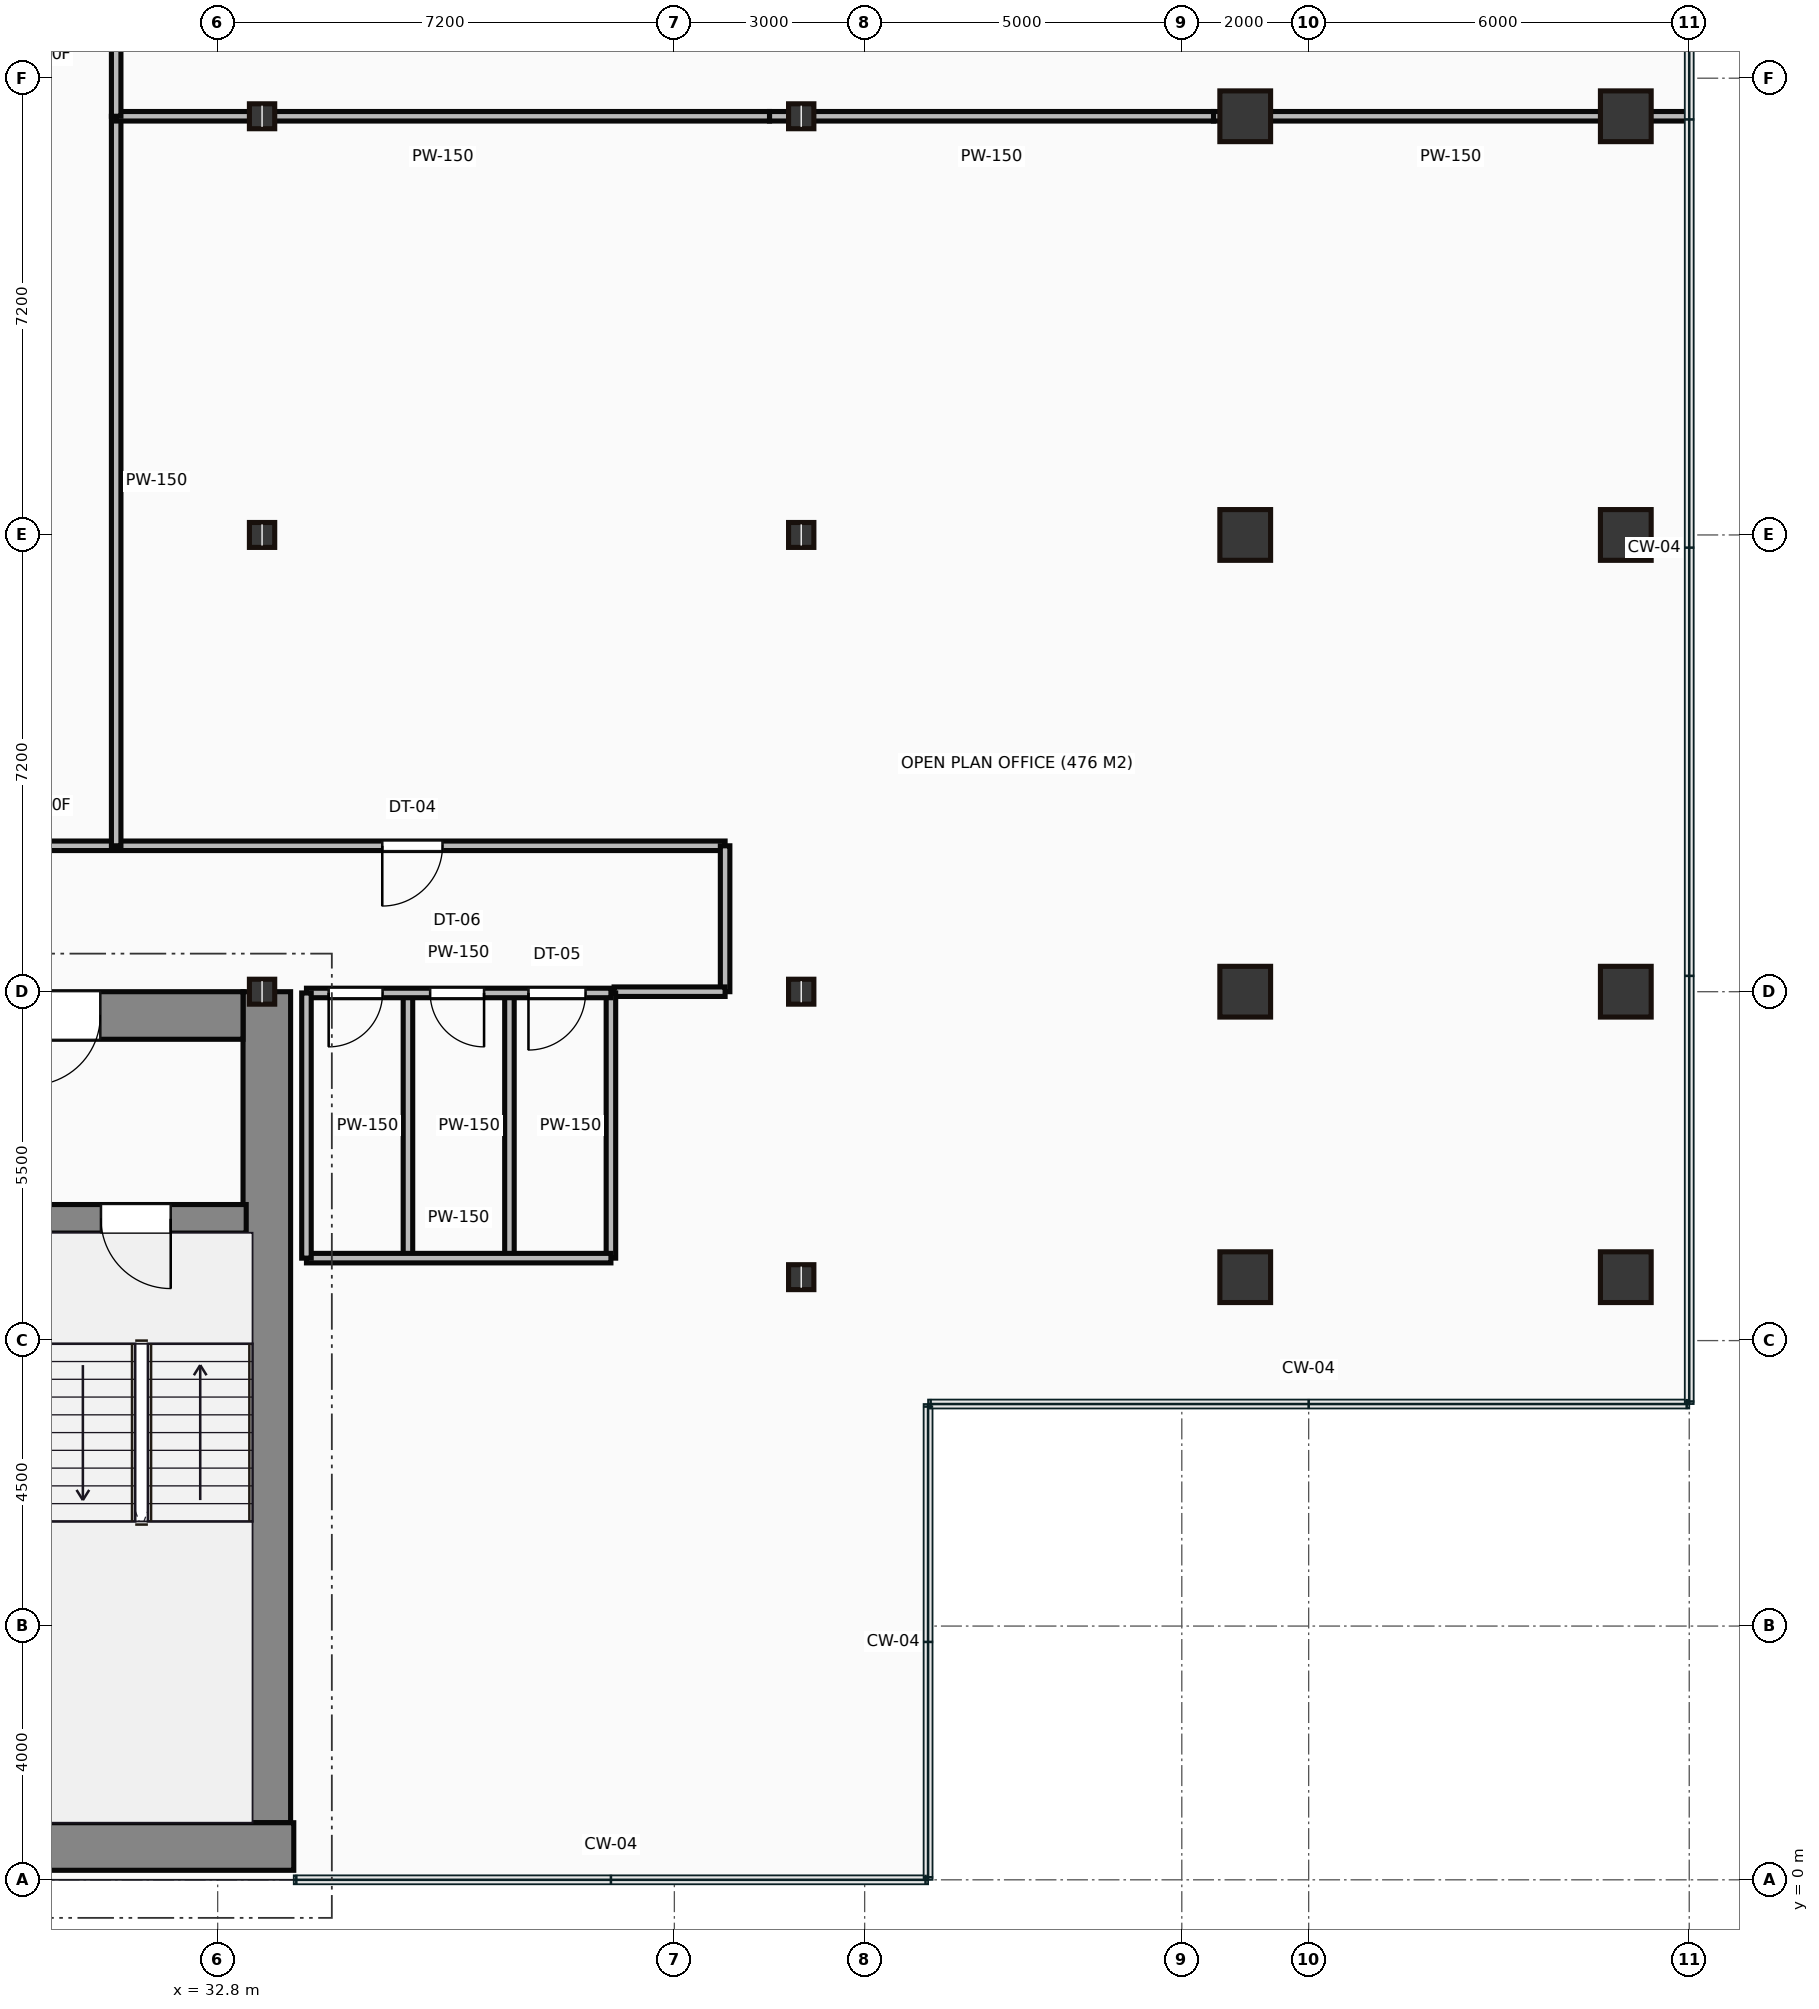
"""IFC4 building model, lengths in metres.
Left out: names, types, materials, properties, quantities, classifications, styles, units other than length and angle.
Written with IfcOpenShell. Run it as: python <this file> out.ifc"""

import sys

from ifc_helpers import new_model, si_unit, direction, frame, frame_2d, origin, origin_2d, place, context, subcontext, project, spatial, rectangle, hollow_rectangle, i_section, extrude, source, transform, mapped, element, fill, save


model = new_model("IFC4")
c1 = context("Model", 3, precision=1e-05, world=origin(), true_north=direction((0.0, 1.0)))
c2 = subcontext(c1, "Body", "Model", "MODEL_VIEW")
j1 = project(units=[si_unit("LENGTHUNIT", "METRE"), si_unit("PLANEANGLEUNIT", "RADIAN")], contexts=[c1])
p1 = place(None, origin())
s1 = spatial("IfcSite", under=j1, at=p1, CompositionType="ELEMENT")
p2 = place(p1, origin())
s2 = spatial("IfcBuilding", under=s1, at=p2, CompositionType="ELEMENT")
p3 = place(p2, frame((0.0, 0.0, 110.55)))
s3 = spatial("IfcBuildingStorey", under=s2, at=p3, CompositionType="ELEMENT", Elevation=110.55)
m1 = source(origin(), c2, "Body", "SweptSolid", [
    extrude(rectangle(XDim=29.5, YDim=0.75, at=frame_2d((14.75, 0.0))), origin(), (0.0, 0.0, 1.0), 3.65),
])
p4 = place(p3, frame((4.5, 0.525, 0.0), z_axis=(0.0, 0.0, 1.0), x_axis=(1.0, 0.0, 0.0)))
e1 = element("IfcWall", 1, at=p4, inside=s3, PredefinedType="SHEAR", context=c2, shape_type="MappedRepresentation", body=[
    mapped(m1, transform((0.0, 0.0, 0.0))),
])
m2 = source(origin(), c2, "Body", "SweptSolid", [
    extrude(rectangle(XDim=13.1, YDim=0.75, at=frame_2d((6.55, 0.0))), origin(), (0.0, 0.0, 1.0), 3.65),
])
p5 = place(p3, frame((33.575, 0.9, 0.0), z_axis=(0.0, 0.0, 1.0), x_axis=(0.0, 1.0, 0.0)))
e2 = element("IfcWall", 2, at=p5, inside=s3, PredefinedType="SHEAR", context=c2, shape_type="MappedRepresentation", body=[
    mapped(m2, transform((0.0, 0.0, 0.0))),
])
m3 = source(origin(), c2, "Body", "SweptSolid", [
    extrude(rectangle(XDim=12.6, YDim=0.75, at=frame_2d((6.3, 0.0))), origin(), (0.0, 0.0, 1.0), 3.65),
])
p6 = place(p3, frame((20.6, 13.625, 0.0), z_axis=(0.0, 0.0, 1.0), x_axis=(1.0, 0.0, 0.0)))
e3 = element("IfcWall", 3, at=p6, inside=s3, PredefinedType="SHEAR", context=c2, shape_type="MappedRepresentation", body=[
    mapped(m3, transform((0.0, 0.0, 0.0))),
])
p7 = place(p6, frame((9.25, 0.0, 0.0)))
e4 = element("IfcOpeningElement", 4, at=p7, cuts=e3, PredefinedType="OPENING", context=c2, shape_type="SweptSolid", body=[
    extrude(rectangle(XDim=1.1, YDim=2.15, at=frame_2d((0.55, 1.075))), frame((0.0, 0.385, 0.0), z_axis=(0.0, -1.0, 0.0), x_axis=(1.0, 0.0, 0.0)), (0.0, 0.0, 1.0), 0.77),
])
m4 = source(origin(), c2, "Body", "SweptSolid", [
    extrude(rectangle(XDim=3.39, YDim=0.45, at=frame_2d((1.695, 0.0))), origin(), (0.0, 0.0, 1.0), 3.65),
])
p8 = place(p3, frame((29.86, 10.42, 0.0), z_axis=(0.0, 0.0, 1.0), x_axis=(1.0, 0.0, 0.0)))
e5 = element("IfcWall", 5, at=p8, inside=s3, PredefinedType="SHEAR", context=c2, shape_type="MappedRepresentation", body=[
    mapped(m4, transform((0.0, 0.0, 0.0))),
])
p9 = place(p8, frame((1.1, 0.0, 0.0)))
e6 = element("IfcOpeningElement", 6, at=p9, cuts=e5, PredefinedType="OPENING", context=c2, shape_type="SweptSolid", body=[
    extrude(rectangle(XDim=1.1, YDim=2.15, at=frame_2d((0.55, 1.075))), frame((0.0, 0.235, 0.0), z_axis=(0.0, -1.0, 0.0), x_axis=(1.0, 0.0, 0.0)), (0.0, 0.0, 1.0), 0.47),
])
m5 = source(origin(), c2, "Body", "SweptSolid", [
    extrude(i_section(OverallWidth=0.399, OverallDepth=0.393, WebThickness=0.023, FlangeThickness=0.037, at=origin_2d()), origin(), (0.0, 0.0, 1.0), 3.65),
])
for number, where, z_axis, x_axis in (
    (7, (33.5, 14.0, 0.0), (0.0, 0.0, 1.0), (1.0, 0.0, 0.0)),
    (8, (33.5, 21.2, 0.0), (0.0, 0.0, 1.0), (1.0, 0.0, 0.0)),
    (9, (33.5, 27.8, 0.0), (0.0, 0.0, 1.0), (1.0, 0.0, 0.0)),
    (10, (42.0, 9.5, 0.0), (0.0, 0.0, 1.0), (1.0, 0.0, 0.0)),
    (11, (42.0, 14.0, 0.0), (0.0, 0.0, 1.0), (1.0, 0.0, 0.0)),
    (12, (42.0, 21.2, 0.0), (0.0, 0.0, 1.0), (1.0, 0.0, 0.0)),
    (13, (42.0, 27.8, 0.0), (0.0, 0.0, 1.0), (1.0, 0.0, 0.0)),
):
    element("IfcColumn", number, at=place(p3, frame(where, z_axis=z_axis, x_axis=x_axis)), inside=s3, PredefinedType="COLUMN", context=c2, shape_type="MappedRepresentation", body=[
        mapped(m5, transform((0.0, 0.0, 0.0))),
    ])
m6 = source(origin(), c2, "Body", "SweptSolid", [
    extrude(hollow_rectangle(XDim=0.8, YDim=0.8, WallThickness=0.04, at=origin_2d()), origin(), (0.0, 0.0, 1.0), 3.65),
])
for number, where, z_axis, x_axis in (
    (14, (49.0, 9.5, 0.0), (0.0, 0.0, 1.0), (1.0, 0.0, 0.0)),
    (15, (49.0, 14.0, 0.0), (0.0, 0.0, 1.0), (1.0, 0.0, 0.0)),
    (16, (49.0, 21.2, 0.0), (0.0, 0.0, 1.0), (1.0, 0.0, 0.0)),
    (17, (49.0, 27.8, 0.0), (0.0, 0.0, 1.0), (1.0, 0.0, 0.0)),
    (18, (55.0, 9.5, 0.0), (0.0, 0.0, 1.0), (1.0, 0.0, 0.0)),
    (19, (55.0, 14.0, 0.0), (0.0, 0.0, 1.0), (1.0, 0.0, 0.0)),
    (20, (55.0, 21.2, 0.0), (0.0, 0.0, 1.0), (1.0, 0.0, 0.0)),
    (21, (55.0, 27.8, 0.0), (0.0, 0.0, 1.0), (1.0, 0.0, 0.0)),
):
    element("IfcColumn", number, at=place(p3, frame(where, z_axis=z_axis, x_axis=x_axis)), inside=s3, PredefinedType="COLUMN", context=c2, shape_type="MappedRepresentation", body=[
        mapped(m6, transform((0.0, 0.0, 0.0))),
    ])
m7 = source(origin(), c2, "Body", "SweptSolid", [
    extrude(rectangle(XDim=4.8, YDim=0.15, at=frame_2d((2.4, 0.0))), origin(), (0.0, 0.0, 1.0), 2.702),
])
p10 = place(p3, frame((34.2, 13.98, 0.0), z_axis=(0.0, 0.0, 1.0), x_axis=(1.0, 0.0, 0.0)))
e22 = element("IfcWall", 22, at=p10, inside=s3, PredefinedType="PARTITIONING", context=c2, shape_type="MappedRepresentation", body=[
    mapped(m7, transform((0.0, 0.0, 0.0))),
])
p11 = place(p10, frame((0.35, 0.0, 0.0)))
e23 = element("IfcOpeningElement", 23, at=p11, cuts=e22, PredefinedType="OPENING", context=c2, shape_type="SweptSolid", body=[
    extrude(rectangle(XDim=0.85, YDim=2.1, at=frame_2d((0.425, 1.05))), frame((0.0, 0.085, 0.0), z_axis=(0.0, -1.0, 0.0), x_axis=(1.0, 0.0, 0.0)), (0.0, 0.0, 1.0), 0.17),
])
p12 = place(p10, frame((1.95, 0.0, 0.0)))
e24 = element("IfcOpeningElement", 24, at=p12, cuts=e22, PredefinedType="OPENING", context=c2, shape_type="SweptSolid", body=[
    extrude(rectangle(XDim=0.85, YDim=2.1, at=frame_2d((0.425, 1.05))), frame((0.0, 0.085, 0.0), z_axis=(0.0, -1.0, 0.0), x_axis=(1.0, 0.0, 0.0)), (0.0, 0.0, 1.0), 0.17),
])
p13 = place(p10, frame((3.5, 0.0, 0.0)))
e25 = element("IfcOpeningElement", 25, at=p13, cuts=e22, PredefinedType="OPENING", context=c2, shape_type="SweptSolid", body=[
    extrude(rectangle(XDim=0.9, YDim=2.1, at=frame_2d((0.45, 1.05))), frame((0.0, 0.085, 0.0), z_axis=(0.0, -1.0, 0.0), x_axis=(1.0, 0.0, 0.0)), (0.0, 0.0, 1.0), 0.17),
])
m8 = source(origin(), c2, "Body", "SweptSolid", [
    extrude(rectangle(XDim=4.8, YDim=0.15, at=frame_2d((2.4, 0.0))), origin(), (0.0, 0.0, 1.0), 3.4),
])
p14 = place(p3, frame((34.2, 9.8, 0.0), z_axis=(0.0, 0.0, 1.0), x_axis=(1.0, 0.0, 0.0)))
e26 = element("IfcWall", 26, at=p14, inside=s3, PredefinedType="PARTITIONING", context=c2, shape_type="MappedRepresentation", body=[
    mapped(m8, transform((0.0, 0.0, 0.0))),
])
m9 = source(origin(), c2, "Body", "SweptSolid", [
    extrude(rectangle(XDim=4.18, YDim=0.15, at=frame_2d((2.09, 0.0))), origin(), (0.0, 0.0, 1.0), 3.4),
])
for number, where, z_axis, x_axis in (
    (27, (39.0, 9.8, 0.0), (0.0, 0.0, 1.0), (0.0, 1.0, 0.0)),
    (28, (34.2, 9.8, 0.0), (0.0, 0.0, 1.0), (0.0, 1.0, 0.0)),
    (29, (35.8, 9.8, 0.0), (0.0, 0.0, 1.0), (0.0, 1.0, 0.0)),
    (30, (37.4, 9.8, 0.0), (0.0, 0.0, 1.0), (0.0, 1.0, 0.0)),
):
    element("IfcWall", number, at=place(p3, frame(where, z_axis=z_axis, x_axis=x_axis)), inside=s3, PredefinedType="PARTITIONING", context=c2, shape_type="MappedRepresentation", body=[
        mapped(m9, transform((0.0, 0.0, 0.0))),
    ])
m10 = source(origin(), c2, "Body", "SweptSolid", [
    extrude(rectangle(XDim=21.75, YDim=0.15, at=frame_2d((10.875, 0.0))), origin(), (0.0, 0.0, 1.0), 3.4),
])
p15 = place(p3, frame((19.05, 16.3, 0.0), z_axis=(0.0, 0.0, 1.0), x_axis=(1.0, 0.0, 0.0)))
e31 = element("IfcWall", 31, at=p15, inside=s3, PredefinedType="PARTITIONING", context=c2, shape_type="MappedRepresentation", body=[
    mapped(m10, transform((0.0, 0.0, 0.0))),
])
p16 = place(p15, frame((16.345, 0.0, 0.0)))
e32 = element("IfcOpeningElement", 32, at=p16, cuts=e31, PredefinedType="OPENING", context=c2, shape_type="SweptSolid", body=[
    extrude(rectangle(XDim=0.95, YDim=2.15, at=frame_2d((0.475, 1.075))), frame((0.0, 0.085, 0.0), z_axis=(0.0, -1.0, 0.0), x_axis=(1.0, 0.0, 0.0)), (0.0, 0.0, 1.0), 0.17),
])
m11 = source(origin(), c2, "Body", "SweptSolid", [
    extrude(rectangle(XDim=2.3, YDim=0.15, at=frame_2d((1.15, 0.0))), origin(), (0.0, 0.0, 1.0), 3.4),
])
p17 = place(p3, frame((40.8, 16.3, 0.0), z_axis=(0.0, 0.0, 1.0), x_axis=(0.0, -1.0, 0.0)))
e33 = element("IfcWall", 33, at=p17, inside=s3, PredefinedType="PARTITIONING", context=c2, shape_type="MappedRepresentation", body=[
    mapped(m11, transform((0.0, 0.0, 0.0))),
])
m12 = source(origin(), c2, "Body", "SweptSolid", [
    extrude(rectangle(XDim=1.75, YDim=0.15, at=frame_2d((0.875, 0.0))), origin(), (0.0, 0.0, 1.0), 2.702),
])
p18 = place(p3, frame((40.8, 14.0, 0.0), z_axis=(0.0, 0.0, 1.0), x_axis=(-1.0, 0.0, 0.0)))
e34 = element("IfcWall", 34, at=p18, inside=s3, PredefinedType="PARTITIONING", context=c2, shape_type="MappedRepresentation", body=[
    mapped(m12, transform((0.0, 0.0, 0.0))),
])
m13 = source(origin(), c2, "Body", "SweptSolid", [
    extrude(rectangle(XDim=11.5, YDim=0.15, at=frame_2d((5.75, 0.0))), origin(), (0.0, 0.0, 1.0), 3.4),
])
p19 = place(p3, frame((31.2, 27.8, 0.0), z_axis=(0.0, 0.0, 1.0), x_axis=(0.0, -1.0, 0.0)))
e35 = element("IfcWall", 35, at=p19, inside=s3, PredefinedType="PARTITIONING", context=c2, shape_type="MappedRepresentation", body=[
    mapped(m13, transform((0.0, 0.0, 0.0))),
])
m14 = source(origin(), c2, "Body", "SweptSolid", [
    extrude(rectangle(XDim=7.48, YDim=0.15, at=frame_2d((3.74, 0.0))), origin(), (0.0, 0.0, 1.0), 2.702),
])
p20 = place(p3, frame((55.98, 27.8, 0.0), z_axis=(0.0, 0.0, 1.0), x_axis=(-1.0, 0.0, 0.0)))
e36 = element("IfcWall", 36, at=p20, inside=s3, PredefinedType="PARTITIONING", context=c2, shape_type="MappedRepresentation", body=[
    mapped(m14, transform((0.0, 0.0, 0.0))),
])
m15 = source(origin(), c2, "Body", "SweptSolid", [
    extrude(rectangle(XDim=7.0, YDim=0.15, at=frame_2d((3.5, 0.0))), origin(), (0.0, 0.0, 1.0), 2.702),
])
p21 = place(p3, frame((48.5, 27.8, 0.0), z_axis=(0.0, 0.0, 1.0), x_axis=(-1.0, 0.0, 0.0)))
e37 = element("IfcWall", 37, at=p21, inside=s3, PredefinedType="PARTITIONING", context=c2, shape_type="MappedRepresentation", body=[
    mapped(m15, transform((0.0, 0.0, 0.0))),
])
m16 = source(origin(), c2, "Body", "SweptSolid", [
    extrude(rectangle(XDim=10.3, YDim=0.15, at=frame_2d((5.15, 0.0))), origin(), (0.0, 0.0, 1.0), 2.702),
])
p22 = place(p3, frame((41.5, 27.8, 0.0), z_axis=(0.0, 0.0, 1.0), x_axis=(-1.0, 0.0, 0.0)))
e38 = element("IfcWall", 38, at=p22, inside=s3, PredefinedType="PARTITIONING", context=c2, shape_type="MappedRepresentation", body=[
    mapped(m16, transform((0.0, 0.0, 0.0))),
])
m17 = source(origin(), c2, "Body", "SweptSolid", [
    extrude(rectangle(XDim=1.6, YDim=0.15, at=frame_2d((0.8, 0.0))), origin(), (0.0, 0.0, 1.0), 3.4),
])
p23 = place(p3, frame((31.2, 29.4, 0.0), z_axis=(0.0, 0.0, 1.0), x_axis=(0.0, -1.0, 0.0)))
e39 = element("IfcWall", 39, at=p23, inside=s3, PredefinedType="PARTITIONING", context=c2, shape_type="MappedRepresentation", body=[
    mapped(m17, transform((0.0, 0.0, 0.0))),
])
m18 = source(origin(), c2, "Body", "SweptSolid", [
    extrude(rectangle(XDim=1.1, YDim=2.15, at=frame_2d((0.55, 1.075))), frame((0.0, 0.025, 0.0), z_axis=(0.0, -1.0, 0.0), x_axis=(1.0, 0.0, 0.0)), (0.0, 0.0, 1.0), 0.05),
])
p24 = place(p9, frame((1.1, 0.0, 0.0), z_axis=(0.0, 0.0, 1.0), x_axis=(-1.0, 0.0, 0.0)))
e40 = element("IfcDoor", 40, at=p24, inside=s3, OperationType="SINGLE_SWING_RIGHT", PredefinedType="DOOR", context=c2, shape_type="MappedRepresentation", body=[
    mapped(m18, transform((0.0, 0.0, 0.0))),
])
fill(e6, e40)
p25 = place(p7, origin())
e41 = element("IfcDoor", 41, at=p25, inside=s3, OperationType="SINGLE_SWING_LEFT", PredefinedType="DOOR", context=c2, shape_type="MappedRepresentation", body=[
    mapped(m18, transform((0.0, 0.0, 0.0))),
])
fill(e4, e41)
m19 = source(origin(), c2, "Body", "SweptSolid", [
    extrude(rectangle(XDim=0.85, YDim=2.1, at=frame_2d((0.425, 1.05))), frame((0.0, 0.025, 0.0), z_axis=(0.0, -1.0, 0.0), x_axis=(1.0, 0.0, 0.0)), (0.0, 0.0, 1.0), 0.05),
])
p26 = place(p11, frame((0.85, 0.0, 0.0), z_axis=(0.0, 0.0, 1.0), x_axis=(-1.0, 0.0, 0.0)))
e42 = element("IfcDoor", 42, at=p26, inside=s3, OperationType="SINGLE_SWING_LEFT", PredefinedType="DOOR", context=c2, shape_type="MappedRepresentation", body=[
    mapped(m19, transform((0.0, 0.0, 0.0))),
])
fill(e23, e42)
p27 = place(p12, frame((0.85, 0.0, 0.0), z_axis=(0.0, 0.0, 1.0), x_axis=(-1.0, 0.0, 0.0)))
e43 = element("IfcDoor", 43, at=p27, inside=s3, OperationType="SINGLE_SWING_RIGHT", PredefinedType="DOOR", context=c2, shape_type="MappedRepresentation", body=[
    mapped(m19, transform((0.0, 0.0, 0.0))),
])
fill(e24, e43)
m20 = source(origin(), c2, "Body", "SweptSolid", [
    extrude(rectangle(XDim=0.9, YDim=2.1, at=frame_2d((0.45, 1.05))), frame((0.0, 0.025, 0.0), z_axis=(0.0, -1.0, 0.0), x_axis=(1.0, 0.0, 0.0)), (0.0, 0.0, 1.0), 0.05),
])
p28 = place(p13, frame((0.9, 0.0, 0.0), z_axis=(0.0, 0.0, 1.0), x_axis=(-1.0, 0.0, 0.0)))
e44 = element("IfcDoor", 44, at=p28, inside=s3, OperationType="SINGLE_SWING_LEFT", PredefinedType="DOOR", context=c2, shape_type="MappedRepresentation", body=[
    mapped(m20, transform((0.0, 0.0, 0.0))),
])
fill(e25, e44)
m21 = source(origin(), c2, "Body", "SweptSolid", [
    extrude(rectangle(XDim=0.95, YDim=2.15, at=frame_2d((0.475, 1.075))), frame((0.0, 0.025, 0.0), z_axis=(0.0, -1.0, 0.0), x_axis=(1.0, 0.0, 0.0)), (0.0, 0.0, 1.0), 0.05),
])
p29 = place(p16, origin())
e45 = element("IfcDoor", 45, at=p29, inside=s3, OperationType="SINGLE_SWING_LEFT", PredefinedType="DOOR", context=c2, shape_type="MappedRepresentation", body=[
    mapped(m21, transform((0.0, 0.0, 0.0))),
])
fill(e32, e45)
save(model, sys.argv[1])
